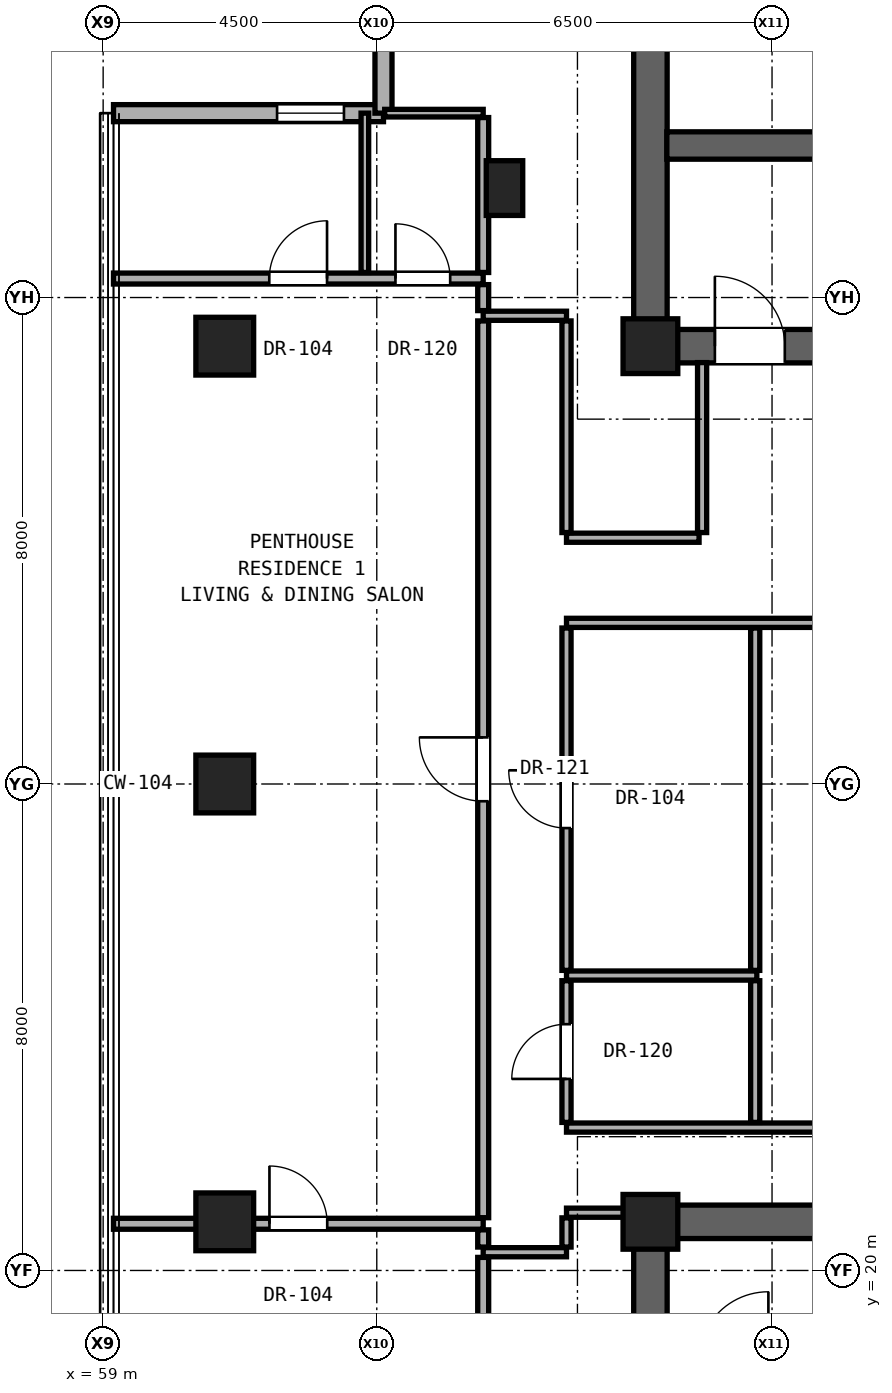
"""IFC4 building model, lengths in metres.
Left out: names, types, materials, properties, quantities, classifications, styles, units other than length and angle.
Written with IfcOpenShell. Run it as: python <this file> out.ifc"""

import sys

from ifc_helpers import new_model, si_unit, direction, frame, frame_2d, origin, origin_2d, place, context, subcontext, project, spatial, rectangle, hollow_rectangle, extrude, element, fill, save


model = new_model("IFC4")
c1 = context("Model", 3, precision=1e-05, world=origin(), true_north=direction((0.0, 1.0)))
c2 = subcontext(c1, "Body", "Model", "MODEL_VIEW")
j1 = project(units=[si_unit("LENGTHUNIT", "METRE"), si_unit("PLANEANGLEUNIT", "RADIAN")], contexts=[c1])
p1 = place(None, origin())
s1 = spatial("IfcSite", under=j1, at=p1, CompositionType="ELEMENT")
p2 = place(p1, origin())
s2 = spatial("IfcBuilding", under=s1, at=p2, CompositionType="ELEMENT")
p3 = place(p2, frame((0.0, 0.0, 196.65)))
s3 = spatial("IfcBuildingStorey", under=s2, at=p3, CompositionType="ELEMENT", Elevation=196.65)
for number, where, z_axis, x_axis in (
    (1, (68.0, 20.8, 0.0), (0.0, 0.0, 1.0), (1.0, 0.0, 0.0)),
    (2, (68.0, 35.2, 0.0), (0.0, 0.0, 1.0), (1.0, 0.0, 0.0)),
):
    element("IfcColumn", number, at=place(p3, frame(where, z_axis=z_axis, x_axis=x_axis)), inside=s3, PredefinedType="COLUMN", context=c2, shape_type="SweptSolid", body=[
        extrude(rectangle(XDim=0.9, YDim=0.9, at=origin_2d()), origin(), (0.0, 0.0, 1.0), 3.25),
    ])
for number, where, z_axis, x_axis in (
    (3, (61.0, 20.8, 0.0), (0.0, 0.0, 1.0), (1.0, 0.0, 0.0)),
    (4, (61.0, 28.0, 0.0), (0.0, 0.0, 1.0), (1.0, 0.0, 0.0)),
    (5, (61.0, 35.2, 0.0), (0.0, 0.0, 1.0), (1.0, 0.0, 0.0)),
):
    element("IfcColumn", number, at=place(p3, frame(where, z_axis=z_axis, x_axis=x_axis)), inside=s3, PredefinedType="COLUMN", context=c2, shape_type="SweptSolid", body=[
        extrude(hollow_rectangle(XDim=0.95, YDim=0.95, WallThickness=0.05, at=origin_2d()), origin(), (0.0, 0.0, 1.0), 3.25),
    ])
p4 = place(p3, frame((65.6, 37.8, 0.0), z_axis=(0.0, 0.0, 1.0), x_axis=(1.0, 0.0, 0.0)))
e6 = element("IfcColumn", 6, at=p4, inside=s3, PredefinedType="PILASTER", context=c2, shape_type="SweptSolid", body=[
    extrude(rectangle(XDim=0.6, YDim=0.9, at=origin_2d()), origin(), (0.0, 0.0, 1.0), 3.25),
])
p5 = place(p3, frame((68.0, 35.2, 0.0), z_axis=(0.0, 0.0, 1.0), x_axis=(0.0, 1.0, 0.0)))
e7 = element("IfcWall", 7, at=p5, inside=s3, PredefinedType="SHEAR", context=c2, shape_type="SweptSolid", body=[
    extrude(rectangle(XDim=5.6, YDim=0.55, at=frame_2d((2.8, 0.0))), origin(), (0.0, 0.0, 1.0), 3.05),
])
p6 = place(p3, frame((68.0, 35.2, 0.0), z_axis=(0.0, 0.0, 1.0), x_axis=(1.0, 0.0, 0.0)))
e8 = element("IfcWall", 8, at=p6, inside=s3, PredefinedType="SHEAR", context=c2, shape_type="SweptSolid", body=[
    extrude(rectangle(XDim=17.0, YDim=0.55, at=frame_2d((8.5, 0.0))), origin(), (0.0, 0.0, 1.0), 3.05),
])
p7 = place(p6, frame((1.06, 0.0, 0.0)))
e9 = element("IfcOpeningElement", 9, at=p7, cuts=e8, PredefinedType="OPENING", context=c2, shape_type="SweptSolid", body=[
    extrude(rectangle(XDim=1.15, YDim=2.2, at=frame_2d((0.575, 1.1))), frame((0.0, 0.285, 0.0), z_axis=(0.0, -1.0, 0.0), x_axis=(1.0, 0.0, 0.0)), (0.0, 0.0, 1.0), 0.57),
])
p8 = place(p6, frame((8.75, 0.0, 0.0)))
e10 = element("IfcOpeningElement", 10, at=p8, cuts=e8, PredefinedType="OPENING", context=c2, shape_type="SweptSolid", body=[
    extrude(rectangle(XDim=1.4, YDim=2.35, at=frame_2d((0.7, 1.175))), frame((0.0, 0.285, 0.0), z_axis=(0.0, -1.0, 0.0), x_axis=(1.0, 0.0, 0.0)), (0.0, 0.0, 1.0), 0.57),
])
p9 = place(p6, frame((10.77, 0.0, 0.0)))
e11 = element("IfcOpeningElement", 11, at=p9, cuts=e8, PredefinedType="OPENING", context=c2, shape_type="SweptSolid", body=[
    extrude(rectangle(XDim=1.3, YDim=2.3, at=frame_2d((0.65, 1.15))), frame((0.0, 0.285, 0.0), z_axis=(0.0, -1.0, 0.0), x_axis=(1.0, 0.0, 0.0)), (0.0, 0.0, 1.0), 0.57),
])
p10 = place(p3, frame((68.0, 15.2, 0.0), z_axis=(0.0, 0.0, 1.0), x_axis=(0.0, 1.0, 0.0)))
e12 = element("IfcWall", 12, at=p10, inside=s3, PredefinedType="SHEAR", context=c2, shape_type="SweptSolid", body=[
    extrude(rectangle(XDim=5.6, YDim=0.55, at=frame_2d((2.8, 0.0))), origin(), (0.0, 0.0, 1.0), 3.05),
])
p11 = place(p3, frame((68.0, 20.8, 0.0), z_axis=(0.0, 0.0, 1.0), x_axis=(1.0, 0.0, 0.0)))
e13 = element("IfcWall", 13, at=p11, inside=s3, PredefinedType="SHEAR", context=c2, shape_type="SweptSolid", body=[
    extrude(rectangle(XDim=17.0, YDim=0.55, at=frame_2d((8.5, 0.0))), origin(), (0.0, 0.0, 1.0), 3.05),
])
p12 = place(p11, frame((9.55, 0.0, 0.0)))
e14 = element("IfcOpeningElement", 14, at=p12, cuts=e13, PredefinedType="OPENING", context=c2, shape_type="SweptSolid", body=[
    extrude(rectangle(XDim=1.3, YDim=2.3, at=frame_2d((0.65, 1.15))), frame((0.0, 0.285, 0.0), z_axis=(0.0, -1.0, 0.0), x_axis=(1.0, 0.0, 0.0)), (0.0, 0.0, 1.0), 0.57),
])
p13 = place(p11, frame((12.05, 0.0, 0.0)))
e15 = element("IfcOpeningElement", 15, at=p13, cuts=e13, PredefinedType="OPENING", context=c2, shape_type="SweptSolid", body=[
    extrude(rectangle(XDim=1.3, YDim=2.3, at=frame_2d((0.65, 1.15))), frame((0.0, 0.285, 0.0), z_axis=(0.0, -1.0, 0.0), x_axis=(1.0, 0.0, 0.0)), (0.0, 0.0, 1.0), 0.57),
])
p14 = place(p3, frame((63.61, 39.032, 0.0), z_axis=(0.0, 0.0, 1.0), x_axis=(-1.0, 0.0, 0.0)))
e16 = element("IfcWall", 16, at=p14, inside=s3, PredefinedType="SOLIDWALL", context=c2, shape_type="SweptSolid", body=[
    extrude(rectangle(XDim=4.44, YDim=0.28, at=frame_2d((2.22, 0.0))), origin(), (0.0, 0.0, 1.0), 3.03),
])
p15 = place(p14, frame((0.65, 0.0, 0.85)))
e17 = element("IfcOpeningElement", 17, at=p15, cuts=e16, PredefinedType="OPENING", context=c2, shape_type="SweptSolid", body=[
    extrude(rectangle(XDim=1.1, YDim=2.0, at=frame_2d((0.55, 1.0))), frame((0.0, 0.15, 0.0), z_axis=(0.0, -1.0, 0.0), x_axis=(1.0, 0.0, 0.0)), (0.0, 0.0, 1.0), 0.3),
])
p16 = place(p3, frame((63.61, 43.472, 0.0), z_axis=(0.0, 0.0, 1.0), x_axis=(0.0, -1.0, 0.0)))
e18 = element("IfcWall", 18, at=p16, inside=s3, PredefinedType="SOLIDWALL", context=c2, shape_type="SweptSolid", body=[
    extrude(rectangle(XDim=4.44, YDim=0.28, at=frame_2d((2.22, 0.0))), origin(), (0.0, 0.0, 1.0), 3.03),
])
p17 = place(p3, frame((65.25, 20.3, 0.0), z_axis=(0.0, 0.0, 1.0), x_axis=(1.0, 0.0, 0.0)))
e19 = element("IfcWall", 19, at=p17, inside=s3, PredefinedType="PARTITIONING", context=c2, shape_type="SweptSolid", body=[
    extrude(rectangle(XDim=1.37, YDim=0.15, at=frame_2d((0.685, 0.0))), origin(), (0.0, 0.0, 1.0), 3.05),
])
p18 = place(p3, frame((59.17, 20.768, 0.0), z_axis=(0.0, 0.0, 1.0), x_axis=(1.0, 0.0, 0.0)))
e20 = element("IfcWall", 20, at=p18, inside=s3, PredefinedType="PARTITIONING", context=c2, shape_type="SweptSolid", body=[
    extrude(rectangle(XDim=6.08, YDim=0.18, at=frame_2d((3.04, 0.0))), origin(), (0.0, 0.0, 1.0), 2.269),
])
p19 = place(p18, frame((2.565, 0.0, 0.0)))
e21 = element("IfcOpeningElement", 21, at=p19, cuts=e20, PredefinedType="OPENING", context=c2, shape_type="SweptSolid", body=[
    extrude(rectangle(XDim=0.95, YDim=2.15, at=frame_2d((0.475, 1.075))), frame((0.0, 0.1, 0.0), z_axis=(0.0, -1.0, 0.0), x_axis=(1.0, 0.0, 0.0)), (0.0, 0.0, 1.0), 0.2),
])
p20 = place(p3, frame((66.62, 20.95, 0.0), z_axis=(0.0, 0.0, 1.0), x_axis=(1.0, 0.0, 0.0)))
e22 = element("IfcWall", 22, at=p20, inside=s3, PredefinedType="PARTITIONING", context=c2, shape_type="SweptSolid", body=[
    extrude(rectangle(XDim=1.11, YDim=0.15, at=frame_2d((0.555, 0.0))), origin(), (0.0, 0.0, 1.0), 2.442),
])
p21 = place(p3, frame((66.62, 22.35, 0.0), z_axis=(0.0, 0.0, 1.0), x_axis=(1.0, 0.0, 0.0)))
e23 = element("IfcWall", 23, at=p21, inside=s3, PredefinedType="PARTITIONING", context=c2, shape_type="SweptSolid", body=[
    extrude(rectangle(XDim=10.14, YDim=0.15, at=frame_2d((5.07, 0.0))), origin(), (0.0, 0.0, 1.0), 2.186),
])
p22 = place(p3, frame((66.62, 24.85, 0.0), z_axis=(0.0, 0.0, 1.0), x_axis=(1.0, 0.0, 0.0)))
e24 = element("IfcWall", 24, at=p22, inside=s3, PredefinedType="PARTITIONING", context=c2, shape_type="SweptSolid", body=[
    extrude(rectangle(XDim=3.13, YDim=0.15, at=frame_2d((1.565, 0.0))), origin(), (0.0, 0.0, 1.0), 2.186),
])
p23 = place(p3, frame((66.62, 30.65, 0.0), z_axis=(0.0, 0.0, 1.0), x_axis=(1.0, 0.0, 0.0)))
e25 = element("IfcWall", 25, at=p23, inside=s3, PredefinedType="PARTITIONING", context=c2, shape_type="SweptSolid", body=[
    extrude(rectangle(XDim=10.14, YDim=0.15, at=frame_2d((5.07, 0.0))), origin(), (0.0, 0.0, 1.0), 2.186),
])
p24 = place(p23, frame((6.14, 0.0, 0.0)))
e26 = element("IfcOpeningElement", 26, at=p24, cuts=e25, PredefinedType="OPENING", context=c2, shape_type="SweptSolid", body=[
    extrude(rectangle(XDim=0.95, YDim=2.15, at=frame_2d((0.475, 1.075))), frame((0.0, 0.085, 0.0), z_axis=(0.0, -1.0, 0.0), x_axis=(1.0, 0.0, 0.0)), (0.0, 0.0, 1.0), 0.17),
])
p25 = place(p3, frame((66.62, 32.05, 0.0), z_axis=(0.0, 0.0, 1.0), x_axis=(1.0, 0.0, 0.0)))
e27 = element("IfcWall", 27, at=p25, inside=s3, PredefinedType="PARTITIONING", context=c2, shape_type="SweptSolid", body=[
    extrude(rectangle(XDim=2.18, YDim=0.15, at=frame_2d((1.09, 0.0))), origin(), (0.0, 0.0, 1.0), 2.186),
])
p26 = place(p3, frame((65.25, 35.7, 0.0), z_axis=(0.0, 0.0, 1.0), x_axis=(1.0, 0.0, 0.0)))
e28 = element("IfcWall", 28, at=p26, inside=s3, PredefinedType="PARTITIONING", context=c2, shape_type="SweptSolid", body=[
    extrude(rectangle(XDim=1.37, YDim=0.15, at=frame_2d((0.685, 0.0))), origin(), (0.0, 0.0, 1.0), 3.05),
])
p27 = place(p3, frame((59.17, 36.312, 0.0), z_axis=(0.0, 0.0, 1.0), x_axis=(1.0, 0.0, 0.0)))
e29 = element("IfcWall", 29, at=p27, inside=s3, PredefinedType="PARTITIONING", context=c2, shape_type="SweptSolid", body=[
    extrude(rectangle(XDim=6.08, YDim=0.18, at=frame_2d((3.04, 0.0))), origin(), (0.0, 0.0, 1.0), 2.493),
])
p28 = place(p27, frame((2.562, 0.0, 0.0)))
e30 = element("IfcOpeningElement", 30, at=p28, cuts=e29, PredefinedType="OPENING", context=c2, shape_type="SweptSolid", body=[
    extrude(rectangle(XDim=0.95, YDim=2.15, at=frame_2d((0.475, 1.075))), frame((0.0, 0.1, 0.0), z_axis=(0.0, -1.0, 0.0), x_axis=(1.0, 0.0, 0.0)), (0.0, 0.0, 1.0), 0.2),
])
p29 = place(p27, frame((4.637, 0.0, 0.0)))
e31 = element("IfcOpeningElement", 31, at=p29, cuts=e29, PredefinedType="OPENING", context=c2, shape_type="SweptSolid", body=[
    extrude(rectangle(XDim=0.9, YDim=2.1, at=frame_2d((0.45, 1.05))), frame((0.0, 0.1, 0.0), z_axis=(0.0, -1.0, 0.0), x_axis=(1.0, 0.0, 0.0)), (0.0, 0.0, 1.0), 0.2),
])
p30 = place(p3, frame((68.27, 38.5, 0.0), z_axis=(0.0, 0.0, 1.0), x_axis=(1.0, 0.0, 0.0)))
e32 = element("IfcWall", 32, at=p30, inside=s3, PredefinedType="SHEAR", context=c2, shape_type="SweptSolid", body=[
    extrude(rectangle(XDim=8.09, YDim=0.45, at=frame_2d((4.045, 0.0))), origin(), (0.0, 0.0, 1.0), 3.05),
])
p31 = place(p3, frame((63.63, 39.032, 0.0), z_axis=(0.0, 0.0, 1.0), x_axis=(1.0, 0.0, 0.0)))
e33 = element("IfcWall", 33, at=p31, inside=s3, PredefinedType="PARTITIONING", context=c2, shape_type="SweptSolid", body=[
    extrude(rectangle(XDim=1.62, YDim=0.125, at=frame_2d((0.81, 0.0))), origin(), (0.0, 0.0, 1.0), 3.05),
])
p32 = place(p3, frame((63.304, 36.412, 0.0), z_axis=(0.0, 0.0, 1.0), x_axis=(0.0, 1.0, 0.0)))
e34 = element("IfcWall", 34, at=p32, inside=s3, PredefinedType="PARTITIONING", context=c2, shape_type="SweptSolid", body=[
    extrude(rectangle(XDim=2.62, YDim=0.125, at=frame_2d((1.31, 0.0))), origin(), (0.0, 0.0, 1.0), 2.493),
])
p33 = place(p3, frame((65.25, 17.041, 0.0), z_axis=(0.0, 0.0, 1.0), x_axis=(0.0, 1.0, 0.0)))
e35 = element("IfcWall", 35, at=p33, inside=s3, PredefinedType="PARTITIONING", context=c2, shape_type="SweptSolid", body=[
    extrude(rectangle(XDim=3.175, YDim=0.18, at=frame_2d((1.587, 0.0))), origin(), (0.0, 0.0, 1.0), 2.493),
])
p34 = place(p3, frame((65.25, 20.385, 0.0), z_axis=(0.0, 0.0, 1.0), x_axis=(0.0, 1.0, 0.0)))
e36 = element("IfcWall", 36, at=p34, inside=s3, PredefinedType="PARTITIONING", context=c2, shape_type="SweptSolid", body=[
    extrude(rectangle(XDim=0.283, YDim=0.18, at=frame_2d((0.142, 0.0))), origin(), (0.0, 0.0, 1.0), 2.442),
])
p35 = place(p3, frame((65.25, 20.868, 0.0), z_axis=(0.0, 0.0, 1.0), x_axis=(0.0, 1.0, 0.0)))
e37 = element("IfcWall", 37, at=p35, inside=s3, PredefinedType="PARTITIONING", context=c2, shape_type="SweptSolid", body=[
    extrude(rectangle(XDim=14.747, YDim=0.18, at=frame_2d((7.374, 0.0))), origin(), (0.0, 0.0, 1.0), 2.346),
])
p36 = place(p35, frame((6.848, 0.0, 0.0)))
e38 = element("IfcOpeningElement", 38, at=p36, cuts=e37, PredefinedType="OPENING", context=c2, shape_type="SweptSolid", body=[
    extrude(rectangle(XDim=1.05, YDim=2.2, at=frame_2d((0.525, 1.1))), frame((0.0, 0.1, 0.0), z_axis=(0.0, -1.0, 0.0), x_axis=(1.0, 0.0, 0.0)), (0.0, 0.0, 1.0), 0.2),
])
p37 = place(p3, frame((65.25, 35.785, 0.0), z_axis=(0.0, 0.0, 1.0), x_axis=(0.0, 1.0, 0.0)))
e39 = element("IfcWall", 39, at=p37, inside=s3, PredefinedType="PARTITIONING", context=c2, shape_type="SweptSolid", body=[
    extrude(rectangle(XDim=0.427, YDim=0.18, at=frame_2d((0.213, 0.0))), origin(), (0.0, 0.0, 1.0), 3.05),
])
p38 = place(p3, frame((65.25, 36.412, 0.0), z_axis=(0.0, 0.0, 1.0), x_axis=(0.0, 1.0, 0.0)))
e40 = element("IfcWall", 40, at=p38, inside=s3, PredefinedType="PARTITIONING", context=c2, shape_type="SweptSolid", body=[
    extrude(rectangle(XDim=2.547, YDim=0.18, at=frame_2d((1.274, 0.0))), origin(), (0.0, 0.0, 1.0), 2.493),
])
p39 = place(p3, frame((66.62, 20.385, 0.0), z_axis=(0.0, 0.0, 1.0), x_axis=(0.0, 1.0, 0.0)))
e41 = element("IfcWall", 41, at=p39, inside=s3, PredefinedType="PARTITIONING", context=c2, shape_type="SweptSolid", body=[
    extrude(rectangle(XDim=0.48, YDim=0.15, at=frame_2d((0.24, 0.0))), origin(), (0.0, 0.0, 1.0), 2.442),
])
p40 = place(p3, frame((66.62, 22.435, 0.0), z_axis=(0.0, 0.0, 1.0), x_axis=(0.0, 1.0, 0.0)))
e42 = element("IfcWall", 42, at=p40, inside=s3, PredefinedType="PARTITIONING", context=c2, shape_type="SweptSolid", body=[
    extrude(rectangle(XDim=2.33, YDim=0.15, at=frame_2d((1.165, 0.0))), origin(), (0.0, 0.0, 1.0), 3.05),
])
p41 = place(p40, frame((0.715, 0.0, 0.0)))
e43 = element("IfcOpeningElement", 43, at=p41, cuts=e42, PredefinedType="OPENING", context=c2, shape_type="SweptSolid", body=[
    extrude(rectangle(XDim=0.9, YDim=2.1, at=frame_2d((0.45, 1.05))), frame((0.0, 0.085, 0.0), z_axis=(0.0, -1.0, 0.0), x_axis=(1.0, 0.0, 0.0)), (0.0, 0.0, 1.0), 0.17),
])
p42 = place(p3, frame((66.62, 24.935, 0.0), z_axis=(0.0, 0.0, 1.0), x_axis=(0.0, 1.0, 0.0)))
e44 = element("IfcWall", 44, at=p42, inside=s3, PredefinedType="PARTITIONING", context=c2, shape_type="SweptSolid", body=[
    extrude(rectangle(XDim=5.63, YDim=0.15, at=frame_2d((2.815, 0.0))), origin(), (0.0, 0.0, 1.0), 2.346),
])
p43 = place(p42, frame((2.34, 0.0, 0.0)))
e45 = element("IfcOpeningElement", 45, at=p43, cuts=e44, PredefinedType="OPENING", context=c2, shape_type="SweptSolid", body=[
    extrude(rectangle(XDim=0.95, YDim=2.15, at=frame_2d((0.475, 1.075))), frame((0.0, 0.085, 0.0), z_axis=(0.0, -1.0, 0.0), x_axis=(1.0, 0.0, 0.0)), (0.0, 0.0, 1.0), 0.17),
])
p44 = place(p3, frame((66.62, 32.135, 0.0), z_axis=(0.0, 0.0, 1.0), x_axis=(0.0, 1.0, 0.0)))
e46 = element("IfcWall", 46, at=p44, inside=s3, PredefinedType="PARTITIONING", context=c2, shape_type="SweptSolid", body=[
    extrude(rectangle(XDim=3.48, YDim=0.15, at=frame_2d((1.74, 0.0))), origin(), (0.0, 0.0, 1.0), 2.442),
])
p45 = place(p3, frame((68.85, 32.135, 0.0), z_axis=(0.0, 0.0, 1.0), x_axis=(0.0, 1.0, 0.0)))
e47 = element("IfcWall", 47, at=p45, inside=s3, PredefinedType="PARTITIONING", context=c2, shape_type="SweptSolid", body=[
    extrude(rectangle(XDim=2.795, YDim=0.15, at=frame_2d((1.397, 0.0))), origin(), (0.0, 0.0, 1.0), 3.05),
])
p46 = place(p3, frame((69.723, 22.435, 0.0), z_axis=(0.0, 0.0, 1.0), x_axis=(0.0, 1.0, 0.0)))
e48 = element("IfcWall", 48, at=p46, inside=s3, PredefinedType="PARTITIONING", context=c2, shape_type="SweptSolid", body=[
    extrude(rectangle(XDim=2.33, YDim=0.15, at=frame_2d((1.165, 0.0))), origin(), (0.0, 0.0, 1.0), 3.05),
])
p47 = place(p3, frame((69.723, 24.935, 0.0), z_axis=(0.0, 0.0, 1.0), x_axis=(0.0, 1.0, 0.0)))
e49 = element("IfcWall", 49, at=p47, inside=s3, PredefinedType="PARTITIONING", context=c2, shape_type="SweptSolid", body=[
    extrude(rectangle(XDim=5.63, YDim=0.15, at=frame_2d((2.815, 0.0))), origin(), (0.0, 0.0, 1.0), 2.186),
])
p48 = place(p15, origin())
e50 = element("IfcWindow", 50, at=p48, inside=s3, PartitioningType="SINGLE_PANEL", PredefinedType="WINDOW", context=c2, shape_type="SweptSolid", body=[
    extrude(rectangle(XDim=1.1, YDim=2.0, at=frame_2d((0.55, 1.0))), frame((0.0, 0.03, 0.0), z_axis=(0.0, -1.0, 0.0), x_axis=(1.0, 0.0, 0.0)), (0.0, 0.0, 1.0), 0.06),
])
fill(e17, e50)
p49 = place(p7, origin())
e51 = element("IfcDoor", 51, at=p49, inside=s3, OperationType="SINGLE_SWING_LEFT", PredefinedType="DOOR", context=c2, shape_type="SweptSolid", body=[
    extrude(rectangle(XDim=1.15, YDim=2.2, at=frame_2d((0.575, 1.1))), frame((0.0, 0.025, 0.0), z_axis=(0.0, -1.0, 0.0), x_axis=(1.0, 0.0, 0.0)), (0.0, 0.0, 1.0), 0.05),
])
fill(e9, e51)
p50 = place(p41, origin())
e52 = element("IfcDoor", 52, at=p50, inside=s3, OperationType="SINGLE_SWING_LEFT", PredefinedType="DOOR", context=c2, shape_type="SweptSolid", body=[
    extrude(rectangle(XDim=0.9, YDim=2.1, at=frame_2d((0.45, 1.05))), frame((0.0, 0.025, 0.0), z_axis=(0.0, -1.0, 0.0), x_axis=(1.0, 0.0, 0.0)), (0.0, 0.0, 1.0), 0.05),
])
fill(e43, e52)
p51 = place(p36, origin())
e53 = element("IfcDoor", 53, at=p51, inside=s3, OperationType="SINGLE_SWING_RIGHT", PredefinedType="DOOR", context=c2, shape_type="SweptSolid", body=[
    extrude(rectangle(XDim=1.05, YDim=2.2, at=frame_2d((0.525, 1.1))), frame((0.0, 0.025, 0.0), z_axis=(0.0, -1.0, 0.0), x_axis=(1.0, 0.0, 0.0)), (0.0, 0.0, 1.0), 0.05),
])
fill(e38, e53)
p52 = place(p19, origin())
e54 = element("IfcDoor", 54, at=p52, inside=s3, OperationType="SINGLE_SWING_LEFT", PredefinedType="DOOR", context=c2, shape_type="SweptSolid", body=[
    extrude(rectangle(XDim=0.95, YDim=2.15, at=frame_2d((0.475, 1.075))), frame((0.0, 0.025, 0.0), z_axis=(0.0, -1.0, 0.0), x_axis=(1.0, 0.0, 0.0)), (0.0, 0.0, 1.0), 0.05),
])
fill(e21, e54)
p53 = place(p28, origin())
e55 = element("IfcDoor", 55, at=p53, inside=s3, OperationType="SINGLE_SWING_RIGHT", PredefinedType="DOOR", context=c2, shape_type="SweptSolid", body=[
    extrude(rectangle(XDim=0.95, YDim=2.15, at=frame_2d((0.475, 1.075))), frame((0.0, 0.025, 0.0), z_axis=(0.0, -1.0, 0.0), x_axis=(1.0, 0.0, 0.0)), (0.0, 0.0, 1.0), 0.05),
])
fill(e30, e55)
p54 = place(p29, origin())
e56 = element("IfcDoor", 56, at=p54, inside=s3, OperationType="SINGLE_SWING_LEFT", PredefinedType="DOOR", context=c2, shape_type="SweptSolid", body=[
    extrude(rectangle(XDim=0.9, YDim=2.1, at=frame_2d((0.45, 1.05))), frame((0.0, 0.025, 0.0), z_axis=(0.0, -1.0, 0.0), x_axis=(1.0, 0.0, 0.0)), (0.0, 0.0, 1.0), 0.05),
])
fill(e31, e56)
p55 = place(p43, origin())
e57 = element("IfcDoor", 57, at=p55, inside=s3, OperationType="SINGLE_SWING_RIGHT", PredefinedType="DOOR", context=c2, shape_type="SweptSolid", body=[
    extrude(rectangle(XDim=0.95, YDim=2.15, at=frame_2d((0.475, 1.075))), frame((0.0, 0.025, 0.0), z_axis=(0.0, -1.0, 0.0), x_axis=(1.0, 0.0, 0.0)), (0.0, 0.0, 1.0), 0.05),
])
fill(e45, e57)
save(model, sys.argv[1])
